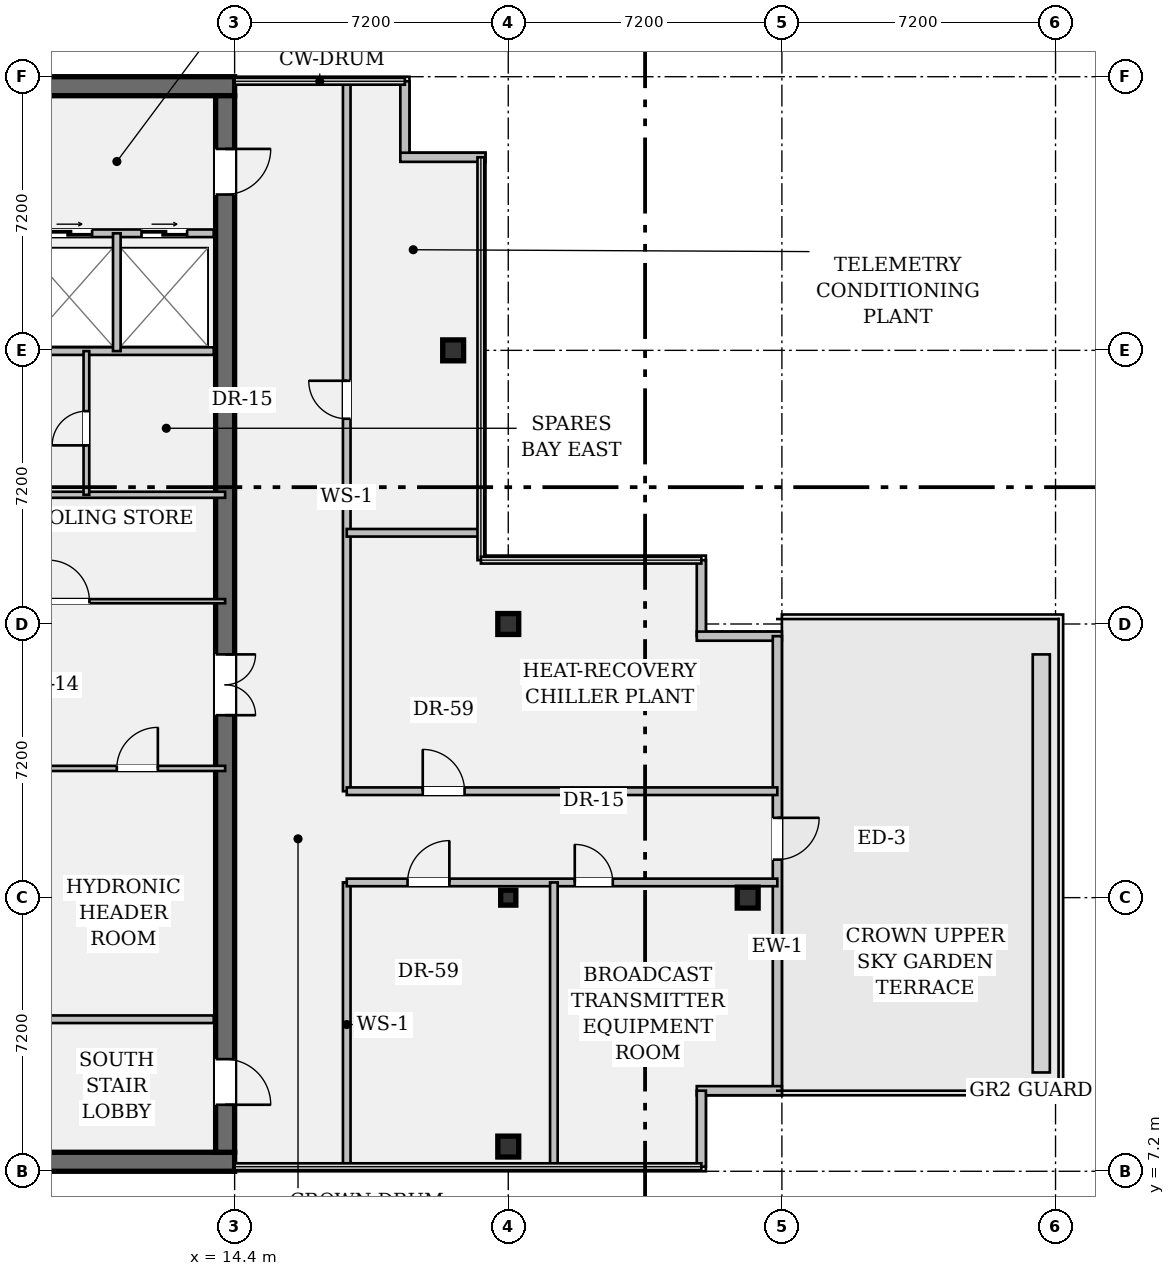
"""IFC4 building model, lengths in metres.
Left out: names, types, materials, properties, quantities, classifications, styles, units other than length and angle.
Written with IfcOpenShell. Run it as: python <this file> out.ifc"""

import sys

from ifc_helpers import new_model, si_unit, direction, frame, frame_2d, origin, origin_2d, place, context, subcontext, project, spatial, rectangle, hollow_rectangle, i_section, extrude, element, fill, save


model = new_model("IFC4")
c1 = context("Model", 3, precision=1e-05, world=origin(), true_north=direction((0.0, 1.0)))
c2 = subcontext(c1, "Body", "Model", "MODEL_VIEW")
j1 = project(units=[si_unit("LENGTHUNIT", "METRE"), si_unit("PLANEANGLEUNIT", "RADIAN")], contexts=[c1])
p1 = place(None, origin())
s1 = spatial("IfcSite", under=j1, at=p1, CompositionType="ELEMENT")
p2 = place(p1, origin())
s2 = spatial("IfcBuilding", under=s1, at=p2, CompositionType="ELEMENT")
p3 = place(p2, frame((0.0, 0.0, 293.65)))
s3 = spatial("IfcBuildingStorey", under=s2, at=p3, CompositionType="ELEMENT", Elevation=293.65)
for number, where, z_axis, x_axis in (
    (1, (0.5, 7.45, 0.0), (0.0, 0.0, 1.0), (1.0, 0.0, 0.0)),
    (2, (0.5, 35.75, 0.0), (0.0, 0.0, 1.0), (1.0, 0.0, 0.0)),
):
    element("IfcWall", number, at=place(p3, frame(where, z_axis=z_axis, x_axis=x_axis)), inside=s3, PredefinedType="SHEAR", context=c2, shape_type="SweptSolid", body=[
        extrude(rectangle(XDim=13.9, YDim=0.5, at=frame_2d((6.95, 0.0))), origin(), (0.0, 0.0, 1.0), 3.59),
    ])
p4 = place(p3, frame((14.15, 35.5, 0.0), z_axis=(0.0, 0.0, 1.0), x_axis=(0.0, -1.0, 0.0)))
e3 = element("IfcWall", 3, at=p4, inside=s3, PredefinedType="SHEAR", context=c2, shape_type="SweptSolid", body=[
    extrude(rectangle(XDim=27.8, YDim=0.5, at=frame_2d((13.9, 0.0))), origin(), (0.0, 0.0, 1.0), 3.59),
])
p5 = place(p4, frame((1.4, 0.0, 0.0)))
e4 = element("IfcOpeningElement", 4, at=p5, cuts=e3, PredefinedType="OPENING", context=c2, shape_type="SweptSolid", body=[
    extrude(rectangle(XDim=1.2, YDim=2.15, at=frame_2d((0.6, 1.075))), frame((0.0, 0.262, 0.0), z_axis=(0.0, -1.0, 0.0), x_axis=(1.0, 0.0, 0.0)), (0.0, 0.0, 1.0), 0.524),
])
p6 = place(p4, frame((25.35, 0.0, 0.0)))
e5 = element("IfcOpeningElement", 5, at=p6, cuts=e3, PredefinedType="OPENING", context=c2, shape_type="SweptSolid", body=[
    extrude(rectangle(XDim=1.2, YDim=2.15, at=frame_2d((0.6, 1.075))), frame((0.0, 0.262, 0.0), z_axis=(0.0, -1.0, 0.0), x_axis=(1.0, 0.0, 0.0)), (0.0, 0.0, 1.0), 0.524),
])
p7 = place(p4, frame((14.7, 0.0, 0.0)))
e6 = element("IfcOpeningElement", 6, at=p7, cuts=e3, PredefinedType="OPENING", context=c2, shape_type="SweptSolid", body=[
    extrude(rectangle(XDim=1.6, YDim=2.2, at=frame_2d((0.8, 1.1))), frame((0.0, 0.262, 0.0), z_axis=(0.0, -1.0, 0.0), x_axis=(1.0, 0.0, 0.0)), (0.0, 0.0, 1.0), 0.524),
])
for number, where, z_axis, x_axis in (
    (7, (20.15, 28.8, 0.0), (0.0, 0.0, 1.0), (1.0, 0.0, 0.0)),
    (8, (21.6, 7.85, 0.0), (0.0, 0.0, 1.0), (1.0, 0.0, 0.0)),
):
    element("IfcColumn", number, at=place(p3, frame(where, z_axis=z_axis, x_axis=x_axis)), inside=s3, PredefinedType="COLUMN", context=c2, shape_type="SweptSolid", body=[
        extrude(hollow_rectangle(XDim=0.55, YDim=0.55, WallThickness=0.035, at=origin_2d()), origin(), (0.0, 0.0, 1.0), 3.59),
    ])
p8 = place(p3, frame((21.6, 14.4, 0.0), z_axis=(0.0, 0.0, 1.0), x_axis=(1.0, 0.0, 0.0)))
e9 = element("IfcColumn", 9, at=p8, inside=s3, PredefinedType="COLUMN", context=c2, shape_type="SweptSolid", body=[
    extrude(i_section(OverallWidth=0.399, OverallDepth=0.394, WebThickness=0.023, FlangeThickness=0.037, FilletRadius=0.018, at=origin_2d()), origin(), (0.0, 0.0, 1.0), 3.59),
])
for number, where, z_axis, x_axis in (
    (10, (21.6, 21.6, 0.0), (0.0, 0.0, 1.0), (1.0, 0.0, 0.0)),
    (11, (27.9, 14.4, 0.0), (0.0, 0.0, 1.0), (1.0, 0.0, 0.0)),
):
    element("IfcColumn", number, at=place(p3, frame(where, z_axis=z_axis, x_axis=x_axis)), inside=s3, PredefinedType="COLUMN", context=c2, shape_type="SweptSolid", body=[
        extrude(hollow_rectangle(XDim=0.55, YDim=0.55, WallThickness=0.035, at=origin_2d()), origin(), (0.0, 0.0, 1.0), 3.59),
    ])
p9 = place(p3, frame((18.88, 35.88, 0.0), z_axis=(0.0, 0.0, 1.0), x_axis=(0.0, -1.0, 0.0)))
e12 = element("IfcWall", 12, at=p9, inside=s3, PredefinedType="STANDARD", context=c2, shape_type="SweptSolid", body=[
    extrude(rectangle(XDim=2.0, YDim=0.24, at=frame_2d((1.0, 0.0))), origin(), (0.0, 0.0, 1.0), 3.59),
])
p10 = place(p3, frame((18.76, 33.88, 0.0), z_axis=(0.0, 0.0, 1.0), x_axis=(1.0, 0.0, 0.0)))
e13 = element("IfcWall", 13, at=p10, inside=s3, PredefinedType="STANDARD", context=c2, shape_type="SweptSolid", body=[
    extrude(rectangle(XDim=2.24, YDim=0.24, at=frame_2d((1.12, 0.0))), origin(), (0.0, 0.0, 1.0), 3.59),
])
p11 = place(p3, frame((26.68, 23.28, 0.0), z_axis=(0.0, 0.0, 1.0), x_axis=(0.0, -1.0, 0.0)))
e14 = element("IfcWall", 14, at=p11, inside=s3, PredefinedType="STANDARD", context=c2, shape_type="SweptSolid", body=[
    extrude(rectangle(XDim=2.0, YDim=0.24, at=frame_2d((1.0, 0.0))), origin(), (0.0, 0.0, 1.0), 3.59),
])
p12 = place(p3, frame((26.56, 21.28, 0.0), z_axis=(0.0, 0.0, 1.0), x_axis=(1.0, 0.0, 0.0)))
e15 = element("IfcWall", 15, at=p12, inside=s3, PredefinedType="STANDARD", context=c2, shape_type="SweptSolid", body=[
    extrude(rectangle(XDim=2.24, YDim=0.24, at=frame_2d((1.12, 0.0))), origin(), (0.0, 0.0, 1.0), 3.59),
])
p13 = place(p3, frame((28.68, 21.28, 0.0), z_axis=(0.0, 0.0, 1.0), x_axis=(0.0, -1.0, 0.0)))
e16 = element("IfcWall", 16, at=p13, inside=s3, PredefinedType="STANDARD", context=c2, shape_type="SweptSolid", body=[
    extrude(rectangle(XDim=11.96, YDim=0.24, at=frame_2d((5.98, 0.0))), origin(), (0.0, 0.0, 1.0), 3.59),
])
p14 = place(p13, frame((4.78, 0.0, 0.0)))
e17 = element("IfcOpeningElement", 17, at=p14, cuts=e16, PredefinedType="OPENING", context=c2, shape_type="SweptSolid", body=[
    extrude(rectangle(XDim=1.1, YDim=2.15, at=frame_2d((0.55, 1.075))), frame((0.0, 0.132, 0.0), z_axis=(0.0, -1.0, 0.0), x_axis=(1.0, 0.0, 0.0)), (0.0, 0.0, 1.0), 0.264),
])
p15 = place(p3, frame((28.8, 9.32, 0.0), z_axis=(0.0, 0.0, 1.0), x_axis=(-1.0, 0.0, 0.0)))
e18 = element("IfcWall", 18, at=p15, inside=s3, PredefinedType="STANDARD", context=c2, shape_type="SweptSolid", body=[
    extrude(rectangle(XDim=2.24, YDim=0.24, at=frame_2d((1.12, 0.0))), origin(), (0.0, 0.0, 1.0), 3.59),
])
p16 = place(p3, frame((26.68, 9.32, 0.0), z_axis=(0.0, 0.0, 1.0), x_axis=(0.0, -1.0, 0.0)))
e19 = element("IfcWall", 19, at=p16, inside=s3, PredefinedType="STANDARD", context=c2, shape_type="SweptSolid", body=[
    extrude(rectangle(XDim=2.0, YDim=0.24, at=frame_2d((1.0, 0.0))), origin(), (0.0, 0.0, 1.0), 3.59),
])
p17 = place(p3, frame((8.7, 31.88, 0.0), z_axis=(0.0, 0.0, 1.0), x_axis=(1.0, 0.0, 0.0)))
e20 = element("IfcWall", 20, at=p17, inside=s3, PredefinedType="PARTITIONING", context=c2, shape_type="SweptSolid", body=[
    extrude(rectangle(XDim=5.15, YDim=0.2, at=frame_2d((2.575, 0.0))), origin(), (0.0, 0.0, 1.0), 3.59),
])
p18 = place(p17, frame((0.75, 0.0, 0.0)))
e21 = element("IfcOpeningElement", 21, at=p18, cuts=e20, PredefinedType="OPENING", context=c2, shape_type="SweptSolid", body=[
    extrude(rectangle(XDim=1.2, YDim=2.2, at=frame_2d((0.6, 1.1))), frame((0.0, 0.112, 0.0), z_axis=(0.0, -1.0, 0.0), x_axis=(1.0, 0.0, 0.0)), (0.0, 0.0, 1.0), 0.224),
])
p19 = place(p17, frame((3.25, 0.0, 0.0)))
e22 = element("IfcOpeningElement", 22, at=p19, cuts=e20, PredefinedType="OPENING", context=c2, shape_type="SweptSolid", body=[
    extrude(rectangle(XDim=1.2, YDim=2.2, at=frame_2d((0.6, 1.1))), frame((0.0, 0.112, 0.0), z_axis=(0.0, -1.0, 0.0), x_axis=(1.0, 0.0, 0.0)), (0.0, 0.0, 1.0), 0.224),
])
for number, where, z_axis, x_axis in (
    (23, (8.7, 11.2, 0.0), (0.0, 0.0, 1.0), (1.0, 0.0, 0.0)),
    (24, (8.7, 28.78, 0.0), (0.0, 0.0, 1.0), (1.0, 0.0, 0.0)),
):
    element("IfcWall", number, at=place(p3, frame(where, z_axis=z_axis, x_axis=x_axis)), inside=s3, PredefinedType="PARTITIONING", context=c2, shape_type="SweptSolid", body=[
        extrude(rectangle(XDim=5.15, YDim=0.2, at=frame_2d((2.575, 0.0))), origin(), (0.0, 0.0, 1.0), 3.59),
    ])
p20 = place(p3, frame((11.3, 28.78, 0.0), z_axis=(0.0, 0.0, 1.0), x_axis=(0.0, 1.0, 0.0)))
e25 = element("IfcWall", 25, at=p20, inside=s3, PredefinedType="PARTITIONING", context=c2, shape_type="SweptSolid", body=[
    extrude(rectangle(XDim=3.1, YDim=0.2, at=frame_2d((1.55, 0.0))), origin(), (0.0, 0.0, 1.0), 3.59),
])
p21 = place(p3, frame((7.1, 22.2, 0.0), z_axis=(0.0, 0.0, 1.0), x_axis=(1.0, 0.0, 0.0)))
e26 = element("IfcWall", 26, at=p21, inside=s3, PredefinedType="PARTITIONING", context=c2, shape_type="SweptSolid", body=[
    extrude(rectangle(XDim=7.05, YDim=0.11, at=frame_2d((3.525, 0.0))), origin(), (0.0, 0.0, 1.0), 3.59),
])
p22 = place(p21, frame((2.4, 0.0, 0.0)))
e27 = element("IfcOpeningElement", 27, at=p22, cuts=e26, PredefinedType="OPENING", context=c2, shape_type="SweptSolid", body=[
    extrude(rectangle(XDim=1.08, YDim=2.15, at=frame_2d((0.54, 1.075))), frame((0.0, 0.067, 0.0), z_axis=(0.0, -1.0, 0.0), x_axis=(1.0, 0.0, 0.0)), (0.0, 0.0, 1.0), 0.134),
])
p23 = place(p3, frame((7.1, 25.0, 0.0), z_axis=(0.0, 0.0, 1.0), x_axis=(1.0, 0.0, 0.0)))
e28 = element("IfcWall", 28, at=p23, inside=s3, PredefinedType="PARTITIONING", context=c2, shape_type="SweptSolid", body=[
    extrude(rectangle(XDim=7.05, YDim=0.16, at=frame_2d((3.525, 0.0))), origin(), (0.0, 0.0, 1.0), 3.59),
])
p24 = place(p3, frame((10.5, 25.0, 0.0), z_axis=(0.0, 0.0, 1.0), x_axis=(0.0, 1.0, 0.0)))
e29 = element("IfcWall", 29, at=p24, inside=s3, PredefinedType="PARTITIONING", context=c2, shape_type="SweptSolid", body=[
    extrude(rectangle(XDim=3.78, YDim=0.15, at=frame_2d((1.89, 0.0))), origin(), (0.0, 0.0, 1.0), 3.59),
])
p25 = place(p24, frame((1.3, 0.0, 0.0)))
e30 = element("IfcOpeningElement", 30, at=p25, cuts=e29, PredefinedType="OPENING", context=c2, shape_type="SweptSolid", body=[
    extrude(rectangle(XDim=0.9, YDim=2.15, at=frame_2d((0.45, 1.075))), frame((0.0, 0.087, 0.0), z_axis=(0.0, -1.0, 0.0), x_axis=(1.0, 0.0, 0.0)), (0.0, 0.0, 1.0), 0.174),
])
p26 = place(p3, frame((5.15, 17.8, 0.0), z_axis=(0.0, 0.0, 1.0), x_axis=(1.0, 0.0, 0.0)))
e31 = element("IfcWall", 31, at=p26, inside=s3, PredefinedType="PARTITIONING", context=c2, shape_type="SweptSolid", body=[
    extrude(rectangle(XDim=9.0, YDim=0.135, at=frame_2d((4.5, 0.0))), origin(), (0.0, 0.0, 1.0), 3.59),
])
p27 = place(p26, frame((2.65, 0.0, 0.0)))
e32 = element("IfcOpeningElement", 32, at=p27, cuts=e31, PredefinedType="OPENING", context=c2, shape_type="SweptSolid", body=[
    extrude(rectangle(XDim=0.9, YDim=2.15, at=frame_2d((0.45, 1.075))), frame((0.0, 0.08, 0.0), z_axis=(0.0, -1.0, 0.0), x_axis=(1.0, 0.0, 0.0)), (0.0, 0.0, 1.0), 0.159),
])
p28 = place(p26, frame((6.15, 0.0, 0.0)))
e33 = element("IfcOpeningElement", 33, at=p28, cuts=e31, PredefinedType="OPENING", context=c2, shape_type="SweptSolid", body=[
    extrude(rectangle(XDim=1.08, YDim=2.15, at=frame_2d((0.54, 1.075))), frame((0.0, 0.08, 0.0), z_axis=(0.0, -1.0, 0.0), x_axis=(1.0, 0.0, 0.0)), (0.0, 0.0, 1.0), 0.159),
])
p29 = place(p3, frame((17.35, 7.32, 0.0), z_axis=(0.0, 0.0, 1.0), x_axis=(0.0, 1.0, 0.0)))
e34 = element("IfcWall", 34, at=p29, inside=s3, PredefinedType="PARTITIONING", context=c2, shape_type="SweptSolid", body=[
    extrude(rectangle(XDim=7.48, YDim=0.2, at=frame_2d((3.74, 0.0))), origin(), (0.0, 0.0, 1.0), 3.026),
])
p30 = place(p3, frame((17.35, 17.2, 0.0), z_axis=(0.0, 0.0, 1.0), x_axis=(0.0, 1.0, 0.0)))
e35 = element("IfcWall", 35, at=p30, inside=s3, PredefinedType="PARTITIONING", context=c2, shape_type="SweptSolid", body=[
    extrude(rectangle(XDim=18.68, YDim=0.2, at=frame_2d((9.34, 0.0))), origin(), (0.0, 0.0, 1.0), 3.026),
])
p31 = place(p30, frame((9.8, 0.0, 0.0)))
e36 = element("IfcOpeningElement", 36, at=p31, cuts=e35, PredefinedType="OPENING", context=c2, shape_type="SweptSolid", body=[
    extrude(rectangle(XDim=1.0, YDim=2.15, at=frame_2d((0.5, 1.075))), frame((0.0, 0.112, 0.0), z_axis=(0.0, -1.0, 0.0), x_axis=(1.0, 0.0, 0.0)), (0.0, 0.0, 1.0), 0.224),
])
p32 = place(p3, frame((17.35, 14.8, 0.0), z_axis=(0.0, 0.0, 1.0), x_axis=(1.0, 0.0, 0.0)))
e37 = element("IfcWall", 37, at=p32, inside=s3, PredefinedType="PARTITIONING", context=c2, shape_type="SweptSolid", body=[
    extrude(rectangle(XDim=11.33, YDim=0.2, at=frame_2d((5.665, 0.0))), origin(), (0.0, 0.0, 1.0), 3.026),
])
p33 = place(p32, frame((1.6, 0.0, 0.0)))
e38 = element("IfcOpeningElement", 38, at=p33, cuts=e37, PredefinedType="OPENING", context=c2, shape_type="SweptSolid", body=[
    extrude(rectangle(XDim=1.1, YDim=2.15, at=frame_2d((0.55, 1.075))), frame((0.0, 0.112, 0.0), z_axis=(0.0, -1.0, 0.0), x_axis=(1.0, 0.0, 0.0)), (0.0, 0.0, 1.0), 0.224),
])
p34 = place(p32, frame((6.0, 0.0, 0.0)))
e39 = element("IfcOpeningElement", 39, at=p34, cuts=e37, PredefinedType="OPENING", context=c2, shape_type="SweptSolid", body=[
    extrude(rectangle(XDim=1.0, YDim=2.15, at=frame_2d((0.5, 1.075))), frame((0.0, 0.112, 0.0), z_axis=(0.0, -1.0, 0.0), x_axis=(1.0, 0.0, 0.0)), (0.0, 0.0, 1.0), 0.224),
])
p35 = place(p3, frame((17.35, 17.2, 0.0), z_axis=(0.0, 0.0, 1.0), x_axis=(1.0, 0.0, 0.0)))
e40 = element("IfcWall", 40, at=p35, inside=s3, PredefinedType="PARTITIONING", context=c2, shape_type="SweptSolid", body=[
    extrude(rectangle(XDim=11.33, YDim=0.2, at=frame_2d((5.665, 0.0))), origin(), (0.0, 0.0, 1.0), 3.026),
])
p36 = place(p35, frame((2.0, 0.0, 0.0)))
e41 = element("IfcOpeningElement", 41, at=p36, cuts=e40, PredefinedType="OPENING", context=c2, shape_type="SweptSolid", body=[
    extrude(rectangle(XDim=1.1, YDim=2.15, at=frame_2d((0.55, 1.075))), frame((0.0, 0.112, 0.0), z_axis=(0.0, -1.0, 0.0), x_axis=(1.0, 0.0, 0.0)), (0.0, 0.0, 1.0), 0.224),
])
p37 = place(p3, frame((17.35, 24.0, 0.0), z_axis=(0.0, 0.0, 1.0), x_axis=(1.0, 0.0, 0.0)))
e42 = element("IfcWall", 42, at=p37, inside=s3, PredefinedType="PARTITIONING", context=c2, shape_type="SweptSolid", body=[
    extrude(rectangle(XDim=3.53, YDim=0.2, at=frame_2d((1.765, 0.0))), origin(), (0.0, 0.0, 1.0), 3.265),
])
p38 = place(p3, frame((22.8, 7.32, 0.0), z_axis=(0.0, 0.0, 1.0), x_axis=(0.0, 1.0, 0.0)))
e43 = element("IfcWall", 43, at=p38, inside=s3, PredefinedType="PARTITIONING", context=c2, shape_type="SweptSolid", body=[
    extrude(rectangle(XDim=7.48, YDim=0.2, at=frame_2d((3.74, 0.0))), origin(), (0.0, 0.0, 1.0), 3.026),
])
p39 = place(p14, origin())
e44 = element("IfcDoor", 44, at=p39, inside=s3, OperationType="SINGLE_SWING_LEFT", PredefinedType="DOOR", context=c2, shape_type="SweptSolid", body=[
    extrude(rectangle(XDim=1.1, YDim=2.15, at=frame_2d((0.55, 1.075))), frame((0.0, 0.025, 0.0), z_axis=(0.0, -1.0, 0.0), x_axis=(1.0, 0.0, 0.0)), (0.0, 0.0, 1.0), 0.05),
])
fill(e17, e44)
p40 = place(p5, origin())
e45 = element("IfcDoor", 45, at=p40, inside=s3, OperationType="SINGLE_SWING_LEFT", PredefinedType="DOOR", context=c2, shape_type="SweptSolid", body=[
    extrude(rectangle(XDim=1.2, YDim=2.15, at=frame_2d((0.6, 1.075))), frame((0.0, 0.025, 0.0), z_axis=(0.0, -1.0, 0.0), x_axis=(1.0, 0.0, 0.0)), (0.0, 0.0, 1.0), 0.05),
])
fill(e4, e45)
p41 = place(p6, origin())
e46 = element("IfcDoor", 46, at=p41, inside=s3, OperationType="SINGLE_SWING_RIGHT", PredefinedType="DOOR", context=c2, shape_type="SweptSolid", body=[
    extrude(rectangle(XDim=1.2, YDim=2.15, at=frame_2d((0.6, 1.075))), frame((0.0, 0.025, 0.0), z_axis=(0.0, -1.0, 0.0), x_axis=(1.0, 0.0, 0.0)), (0.0, 0.0, 1.0), 0.05),
])
fill(e5, e46)
p42 = place(p18, origin())
e47 = element("IfcDoor", 47, at=p42, inside=s3, OperationType="DOUBLE_DOOR_SLIDING", PredefinedType="DOOR", context=c2, shape_type="SweptSolid", body=[
    extrude(rectangle(XDim=1.2, YDim=2.2, at=frame_2d((0.6, 1.1))), frame((0.0, 0.025, 0.0), z_axis=(0.0, -1.0, 0.0), x_axis=(1.0, 0.0, 0.0)), (0.0, 0.0, 1.0), 0.05),
])
fill(e21, e47)
p43 = place(p19, origin())
e48 = element("IfcDoor", 48, at=p43, inside=s3, OperationType="DOUBLE_DOOR_SLIDING", PredefinedType="DOOR", context=c2, shape_type="SweptSolid", body=[
    extrude(rectangle(XDim=1.2, YDim=2.2, at=frame_2d((0.6, 1.1))), frame((0.0, 0.025, 0.0), z_axis=(0.0, -1.0, 0.0), x_axis=(1.0, 0.0, 0.0)), (0.0, 0.0, 1.0), 0.05),
])
fill(e22, e48)
p44 = place(p7, origin())
e49 = element("IfcDoor", 49, at=p44, inside=s3, OperationType="DOUBLE_DOOR_SINGLE_SWING", PredefinedType="DOOR", context=c2, shape_type="SweptSolid", body=[
    extrude(rectangle(XDim=1.6, YDim=2.2, at=frame_2d((0.8, 1.1))), frame((0.0, 0.025, 0.0), z_axis=(0.0, -1.0, 0.0), x_axis=(1.0, 0.0, 0.0)), (0.0, 0.0, 1.0), 0.05),
])
fill(e6, e49)
p45 = place(p22, origin())
e50 = element("IfcDoor", 50, at=p45, inside=s3, OperationType="SINGLE_SWING_LEFT", PredefinedType="DOOR", context=c2, shape_type="SweptSolid", body=[
    extrude(rectangle(XDim=1.08, YDim=2.15, at=frame_2d((0.54, 1.075))), frame((0.0, 0.025, 0.0), z_axis=(0.0, -1.0, 0.0), x_axis=(1.0, 0.0, 0.0)), (0.0, 0.0, 1.0), 0.05),
])
fill(e27, e50)
p46 = place(p25, origin())
e51 = element("IfcDoor", 51, at=p46, inside=s3, OperationType="SINGLE_SWING_LEFT", PredefinedType="DOOR", context=c2, shape_type="SweptSolid", body=[
    extrude(rectangle(XDim=0.9, YDim=2.15, at=frame_2d((0.45, 1.075))), frame((0.0, 0.025, 0.0), z_axis=(0.0, -1.0, 0.0), x_axis=(1.0, 0.0, 0.0)), (0.0, 0.0, 1.0), 0.05),
])
fill(e30, e51)
p47 = place(p28, origin())
e52 = element("IfcDoor", 52, at=p47, inside=s3, OperationType="SINGLE_SWING_RIGHT", PredefinedType="DOOR", context=c2, shape_type="SweptSolid", body=[
    extrude(rectangle(XDim=1.08, YDim=2.15, at=frame_2d((0.54, 1.075))), frame((0.0, 0.025, 0.0), z_axis=(0.0, -1.0, 0.0), x_axis=(1.0, 0.0, 0.0)), (0.0, 0.0, 1.0), 0.05),
])
fill(e33, e52)
p48 = place(p31, origin())
e53 = element("IfcDoor", 53, at=p48, inside=s3, OperationType="SINGLE_SWING_RIGHT", PredefinedType="DOOR", context=c2, shape_type="SweptSolid", body=[
    extrude(rectangle(XDim=1.0, YDim=2.15, at=frame_2d((0.5, 1.075))), frame((0.0, 0.025, 0.0), z_axis=(0.0, -1.0, 0.0), x_axis=(1.0, 0.0, 0.0)), (0.0, 0.0, 1.0), 0.05),
])
fill(e36, e53)
p49 = place(p36, origin())
e54 = element("IfcDoor", 54, at=p49, inside=s3, OperationType="SINGLE_SWING_LEFT", PredefinedType="DOOR", context=c2, shape_type="SweptSolid", body=[
    extrude(rectangle(XDim=1.1, YDim=2.15, at=frame_2d((0.55, 1.075))), frame((0.0, 0.025, 0.0), z_axis=(0.0, -1.0, 0.0), x_axis=(1.0, 0.0, 0.0)), (0.0, 0.0, 1.0), 0.05),
])
fill(e41, e54)
p50 = place(p33, origin())
e55 = element("IfcDoor", 55, at=p50, inside=s3, OperationType="SINGLE_SWING_RIGHT", PredefinedType="DOOR", context=c2, shape_type="SweptSolid", body=[
    extrude(rectangle(XDim=1.1, YDim=2.15, at=frame_2d((0.55, 1.075))), frame((0.0, 0.025, 0.0), z_axis=(0.0, -1.0, 0.0), x_axis=(1.0, 0.0, 0.0)), (0.0, 0.0, 1.0), 0.05),
])
fill(e38, e55)
p51 = place(p34, origin())
e56 = element("IfcDoor", 56, at=p51, inside=s3, OperationType="SINGLE_SWING_LEFT", PredefinedType="DOOR", context=c2, shape_type="SweptSolid", body=[
    extrude(rectangle(XDim=1.0, YDim=2.15, at=frame_2d((0.5, 1.075))), frame((0.0, 0.025, 0.0), z_axis=(0.0, -1.0, 0.0), x_axis=(1.0, 0.0, 0.0)), (0.0, 0.0, 1.0), 0.05),
])
fill(e39, e56)
save(model, sys.argv[1])
